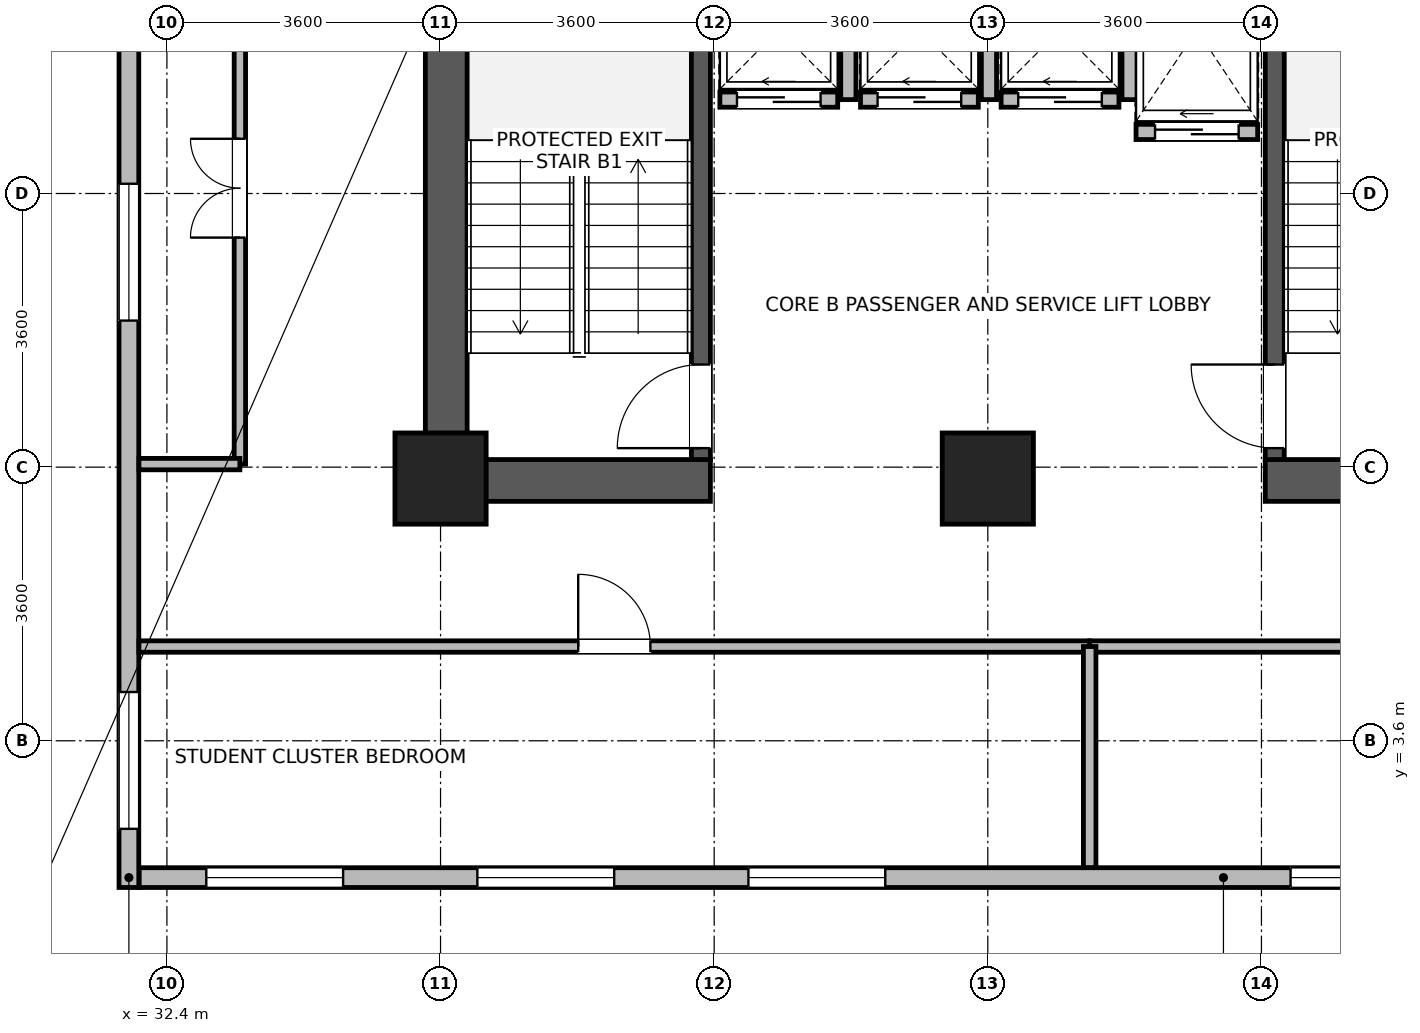
"""IFC4 building model, lengths in metres.
Left out: names, types, materials, properties, quantities, classifications, styles, units other than length and angle.
Written with IfcOpenShell. Run it as: python <this file> out.ifc"""

import sys

from ifc_helpers import new_model, si_unit, direction, frame, frame_2d, origin, origin_2d, place, context, subcontext, project, spatial, rectangle, extrude, source, transform, mapped, element, fill, save


model = new_model("IFC4")
c1 = context("Model", 3, precision=1e-05, world=origin(), true_north=direction((0.0, 1.0)))
c2 = subcontext(c1, "Body", "Model", "MODEL_VIEW")
j1 = project(units=[si_unit("LENGTHUNIT", "METRE"), si_unit("PLANEANGLEUNIT", "RADIAN")], contexts=[c1])
p1 = place(None, origin())
s1 = spatial("IfcSite", under=j1, at=p1, CompositionType="ELEMENT")
p2 = place(p1, origin())
s2 = spatial("IfcBuilding", under=s1, at=p2, CompositionType="ELEMENT")
p3 = place(p2, frame((0.0, 0.0, 86.0)))
s3 = spatial("IfcBuildingStorey", under=s2, at=p3, CompositionType="ELEMENT", Elevation=86.0)
p4 = place(p3, frame((36.075, 6.75, 0.0), z_axis=(0.0, 0.0, 1.0), x_axis=(0.0, 1.0, 0.0)))
e1 = element("IfcWall", 1, at=p4, inside=s3, PredefinedType="SHEAR", context=c2, shape_type="SweptSolid", body=[
    extrude(rectangle(XDim=8.1, YDim=0.55, at=frame_2d((4.05, 0.0))), origin(), (0.0, 0.0, 1.0), 3.45),
])
for number, where, z_axis, x_axis in (
    (2, (36.35, 7.025, 0.0), (0.0, 0.0, 1.0), (1.0, 0.0, 0.0)),
    (3, (46.85, 7.025, 0.0), (0.0, 0.0, 1.0), (1.0, 0.0, 0.0)),
):
    element("IfcWall", number, at=place(p3, frame(where, z_axis=z_axis, x_axis=x_axis)), inside=s3, PredefinedType="SHEAR", context=c2, shape_type="SweptSolid", body=[
        extrude(rectangle(XDim=3.2, YDim=0.55, at=frame_2d((1.6, 0.0))), origin(), (0.0, 0.0, 1.0), 3.45),
    ])
p5 = place(p3, frame((39.425, 7.3, 0.0), z_axis=(0.0, 0.0, 1.0), x_axis=(0.0, 1.0, 0.0)))
e4 = element("IfcWall", 4, at=p5, inside=s3, PredefinedType="SHEAR", context=c2, shape_type="SweptSolid", body=[
    extrude(rectangle(XDim=7.0, YDim=0.25, at=frame_2d((3.5, 0.0))), origin(), (0.0, 0.0, 1.0), 3.45),
])
p6 = place(p5, frame((0.15, 0.0, 0.0)))
e5 = element("IfcOpeningElement", 5, at=p6, cuts=e4, PredefinedType="OPENING", context=c2, shape_type="SweptSolid", body=[
    extrude(rectangle(XDim=1.1, YDim=2.08, at=frame_2d((0.55, 1.04))), frame((0.0, 0.135, 0.0), z_axis=(0.0, -1.0, 0.0), x_axis=(1.0, 0.0, 0.0)), (0.0, 0.0, 1.0), 0.27),
])
p7 = place(p3, frame((46.975, 7.3, 0.0), z_axis=(0.0, 0.0, 1.0), x_axis=(0.0, 1.0, 0.0)))
e6 = element("IfcWall", 6, at=p7, inside=s3, PredefinedType="SHEAR", context=c2, shape_type="SweptSolid", body=[
    extrude(rectangle(XDim=7.0, YDim=0.25, at=frame_2d((3.5, 0.0))), origin(), (0.0, 0.0, 1.0), 3.45),
])
p8 = place(p7, frame((0.15, 0.0, 0.0)))
e7 = element("IfcOpeningElement", 7, at=p8, cuts=e6, PredefinedType="OPENING", context=c2, shape_type="SweptSolid", body=[
    extrude(rectangle(XDim=1.1, YDim=2.08, at=frame_2d((0.55, 1.04))), frame((0.0, 0.135, 0.0), z_axis=(0.0, -1.0, 0.0), x_axis=(1.0, 0.0, 0.0)), (0.0, 0.0, 1.0), 0.27),
])
m1 = source(origin(), c2, "Body", "SweptSolid", [
    extrude(rectangle(XDim=1.2, YDim=1.2, at=origin_2d()), origin(), (0.0, 0.0, 1.0), 3.7),
])
for number, where, z_axis, x_axis in (
    (8, (36.0, 7.05, 0.0), (0.0, 0.0, 1.0), (1.0, 0.0, 0.0)),
    (9, (43.2, 7.05, 0.0), (0.0, 0.0, 1.0), (1.0, 0.0, 0.0)),
):
    element("IfcColumn", number, at=place(p3, frame(where, z_axis=z_axis, x_axis=x_axis)), inside=s3, PredefinedType="COLUMN", context=c2, shape_type="MappedRepresentation", body=[
        mapped(m1, transform((0.0, 0.0, 0.0), x_axis=(1.0, 0.0, 0.0), y_axis=(0.0, 1.0, 0.0), z_axis=(0.0, 0.0, 1.0), scale=1.0)),
    ])
p9 = place(p3, frame((60.565, 1.8, 0.0), z_axis=(0.0, 0.0, 1.0), x_axis=(-1.0, 0.0, 0.0)))
e10 = element("IfcWall", 10, at=p9, inside=s3, PredefinedType="STANDARD", context=c2, shape_type="SweptSolid", body=[
    extrude(rectangle(XDim=28.53, YDim=0.26, at=frame_2d((14.265, 0.0))), origin(), (0.0, 0.0, 1.0), 3.43),
])
p10 = place(p9, frame((4.449, 0.0, 0.85)))
e11 = element("IfcOpeningElement", 11, at=p10, cuts=e10, PredefinedType="OPENING", context=c2, shape_type="SweptSolid", body=[
    extrude(rectangle(XDim=1.8, YDim=1.85, at=frame_2d((0.9, 0.925))), frame((0.0, 0.14, 0.0), z_axis=(0.0, -1.0, 0.0), x_axis=(1.0, 0.0, 0.0)), (0.0, 0.0, 1.0), 0.28),
])
p11 = place(p9, frame((8.016, 0.0, 0.85)))
e12 = element("IfcOpeningElement", 12, at=p11, cuts=e10, PredefinedType="OPENING", context=c2, shape_type="SweptSolid", body=[
    extrude(rectangle(XDim=1.8, YDim=1.85, at=frame_2d((0.9, 0.925))), frame((0.0, 0.14, 0.0), z_axis=(0.0, -1.0, 0.0), x_axis=(1.0, 0.0, 0.0)), (0.0, 0.0, 1.0), 0.28),
])
p12 = place(p9, frame((11.582, 0.0, 0.85)))
e13 = element("IfcOpeningElement", 13, at=p12, cuts=e10, PredefinedType="OPENING", context=c2, shape_type="SweptSolid", body=[
    extrude(rectangle(XDim=1.8, YDim=1.85, at=frame_2d((0.9, 0.925))), frame((0.0, 0.14, 0.0), z_axis=(0.0, -1.0, 0.0), x_axis=(1.0, 0.0, 0.0)), (0.0, 0.0, 1.0), 0.28),
])
p13 = place(p9, frame((18.714, 0.0, 0.85)))
e14 = element("IfcOpeningElement", 14, at=p13, cuts=e10, PredefinedType="OPENING", context=c2, shape_type="SweptSolid", body=[
    extrude(rectangle(XDim=1.8, YDim=1.85, at=frame_2d((0.9, 0.925))), frame((0.0, 0.14, 0.0), z_axis=(0.0, -1.0, 0.0), x_axis=(1.0, 0.0, 0.0)), (0.0, 0.0, 1.0), 0.28),
])
p14 = place(p9, frame((22.281, 0.0, 0.85)))
e15 = element("IfcOpeningElement", 15, at=p14, cuts=e10, PredefinedType="OPENING", context=c2, shape_type="SweptSolid", body=[
    extrude(rectangle(XDim=1.8, YDim=1.85, at=frame_2d((0.9, 0.925))), frame((0.0, 0.14, 0.0), z_axis=(0.0, -1.0, 0.0), x_axis=(1.0, 0.0, 0.0)), (0.0, 0.0, 1.0), 0.28),
])
p15 = place(p9, frame((25.847, 0.0, 0.85)))
e16 = element("IfcOpeningElement", 16, at=p15, cuts=e10, PredefinedType="OPENING", context=c2, shape_type="SweptSolid", body=[
    extrude(rectangle(XDim=1.8, YDim=1.85, at=frame_2d((0.9, 0.925))), frame((0.0, 0.14, 0.0), z_axis=(0.0, -1.0, 0.0), x_axis=(1.0, 0.0, 0.0)), (0.0, 0.0, 1.0), 0.28),
])
p16 = place(p3, frame((31.9, 1.67, 0.0), z_axis=(0.0, 0.0, 1.0), x_axis=(0.0, 1.0, 0.0)))
e17 = element("IfcWall", 17, at=p16, inside=s3, PredefinedType="STANDARD", context=c2, shape_type="SweptSolid", body=[
    extrude(rectangle(XDim=20.06, YDim=0.26, at=frame_2d((10.03, 0.0))), origin(), (0.0, 0.0, 1.0), 3.43),
])
p17 = place(p16, frame((0.772, 0.0, 0.85)))
e18 = element("IfcOpeningElement", 18, at=p17, cuts=e17, PredefinedType="OPENING", context=c2, shape_type="SweptSolid", body=[
    extrude(rectangle(XDim=1.8, YDim=1.85, at=frame_2d((0.9, 0.925))), frame((0.0, 0.14, 0.0), z_axis=(0.0, -1.0, 0.0), x_axis=(1.0, 0.0, 0.0)), (0.0, 0.0, 1.0), 0.28),
])
p18 = place(p16, frame((7.458, 0.0, 0.85)))
e19 = element("IfcOpeningElement", 19, at=p18, cuts=e17, PredefinedType="OPENING", context=c2, shape_type="SweptSolid", body=[
    extrude(rectangle(XDim=1.8, YDim=1.85, at=frame_2d((0.9, 0.925))), frame((0.0, 0.14, 0.0), z_axis=(0.0, -1.0, 0.0), x_axis=(1.0, 0.0, 0.0)), (0.0, 0.0, 1.0), 0.28),
])
p19 = place(p16, frame((14.145, 0.0, 0.85)))
e20 = element("IfcOpeningElement", 20, at=p19, cuts=e17, PredefinedType="OPENING", context=c2, shape_type="SweptSolid", body=[
    extrude(rectangle(XDim=1.8, YDim=1.85, at=frame_2d((0.9, 0.925))), frame((0.0, 0.14, 0.0), z_axis=(0.0, -1.0, 0.0), x_axis=(1.0, 0.0, 0.0)), (0.0, 0.0, 1.0), 0.28),
])
p20 = place(p16, frame((17.488, 0.0, 0.85)))
e21 = element("IfcOpeningElement", 21, at=p20, cuts=e17, PredefinedType="OPENING", context=c2, shape_type="SweptSolid", body=[
    extrude(rectangle(XDim=1.8, YDim=1.85, at=frame_2d((0.9, 0.925))), frame((0.0, 0.14, 0.0), z_axis=(0.0, -1.0, 0.0), x_axis=(1.0, 0.0, 0.0)), (0.0, 0.0, 1.0), 0.28),
])
p21 = place(p3, frame((39.675, 12.035, 0.0), z_axis=(0.0, 0.0, 1.0), x_axis=(1.0, 0.0, 0.0)))
e22 = element("IfcWall", 22, at=p21, inside=s3, PredefinedType="PARTITIONING", context=c2, shape_type="SweptSolid", body=[
    extrude(rectangle(XDim=1.55, YDim=0.2, at=frame_2d((0.775, 0.0))), origin(), (0.0, 0.0, 1.0), 3.43),
])
p22 = place(p21, frame((0.225, 0.0, 0.0)))
e23 = element("IfcOpeningElement", 23, at=p22, cuts=e22, PredefinedType="OPENING", context=c2, shape_type="SweptSolid", body=[
    extrude(rectangle(XDim=1.1, YDim=2.12, at=frame_2d((0.55, 1.06))), frame((0.0, 0.11, 0.0), z_axis=(0.0, -1.0, 0.0), x_axis=(1.0, 0.0, 0.0)), (0.0, 0.0, 1.0), 0.22),
])
p23 = place(p3, frame((41.365, 12.035, 0.0), z_axis=(0.0, 0.0, 1.0), x_axis=(0.0, 1.0, 0.0)))
e24 = element("IfcWall", 24, at=p23, inside=s3, PredefinedType="PARTITIONING", context=c2, shape_type="SweptSolid", body=[
    extrude(rectangle(XDim=1.83, YDim=0.2, at=frame_2d((0.915, 0.0))), origin(), (0.0, 0.0, 1.0), 3.43),
])
p24 = place(p3, frame((41.525, 12.035, 0.0), z_axis=(0.0, 0.0, 1.0), x_axis=(1.0, 0.0, 0.0)))
e25 = element("IfcWall", 25, at=p24, inside=s3, PredefinedType="PARTITIONING", context=c2, shape_type="SweptSolid", body=[
    extrude(rectangle(XDim=1.55, YDim=0.2, at=frame_2d((0.775, 0.0))), origin(), (0.0, 0.0, 1.0), 3.43),
])
p25 = place(p24, frame((0.225, 0.0, 0.0)))
e26 = element("IfcOpeningElement", 26, at=p25, cuts=e25, PredefinedType="OPENING", context=c2, shape_type="SweptSolid", body=[
    extrude(rectangle(XDim=1.1, YDim=2.12, at=frame_2d((0.55, 1.06))), frame((0.0, 0.11, 0.0), z_axis=(0.0, -1.0, 0.0), x_axis=(1.0, 0.0, 0.0)), (0.0, 0.0, 1.0), 0.22),
])
p26 = place(p3, frame((43.215, 12.035, 0.0), z_axis=(0.0, 0.0, 1.0), x_axis=(0.0, 1.0, 0.0)))
e27 = element("IfcWall", 27, at=p26, inside=s3, PredefinedType="PARTITIONING", context=c2, shape_type="SweptSolid", body=[
    extrude(rectangle(XDim=1.83, YDim=0.2, at=frame_2d((0.915, 0.0))), origin(), (0.0, 0.0, 1.0), 3.43),
])
p27 = place(p3, frame((43.375, 12.035, 0.0), z_axis=(0.0, 0.0, 1.0), x_axis=(1.0, 0.0, 0.0)))
e28 = element("IfcWall", 28, at=p27, inside=s3, PredefinedType="PARTITIONING", context=c2, shape_type="SweptSolid", body=[
    extrude(rectangle(XDim=1.55, YDim=0.2, at=frame_2d((0.775, 0.0))), origin(), (0.0, 0.0, 1.0), 3.43),
])
p28 = place(p27, frame((0.225, 0.0, 0.0)))
e29 = element("IfcOpeningElement", 29, at=p28, cuts=e28, PredefinedType="OPENING", context=c2, shape_type="SweptSolid", body=[
    extrude(rectangle(XDim=1.1, YDim=2.12, at=frame_2d((0.55, 1.06))), frame((0.0, 0.11, 0.0), z_axis=(0.0, -1.0, 0.0), x_axis=(1.0, 0.0, 0.0)), (0.0, 0.0, 1.0), 0.22),
])
p29 = place(p3, frame((45.065, 12.035, 0.0), z_axis=(0.0, 0.0, 1.0), x_axis=(0.0, 1.0, 0.0)))
e30 = element("IfcWall", 30, at=p29, inside=s3, PredefinedType="PARTITIONING", context=c2, shape_type="SweptSolid", body=[
    extrude(rectangle(XDim=1.83, YDim=0.2, at=frame_2d((0.915, 0.0))), origin(), (0.0, 0.0, 1.0), 3.43),
])
p30 = place(p3, frame((45.15, 11.61, 0.0), z_axis=(0.0, 0.0, 1.0), x_axis=(1.0, 0.0, 0.0)))
e31 = element("IfcWall", 31, at=p30, inside=s3, PredefinedType="PARTITIONING", context=c2, shape_type="SweptSolid", body=[
    extrude(rectangle(XDim=1.6, YDim=0.2, at=frame_2d((0.8, 0.0))), origin(), (0.0, 0.0, 1.0), 3.43),
])
p31 = place(p30, frame((0.25, 0.0, 0.0)))
e32 = element("IfcOpeningElement", 32, at=p31, cuts=e31, PredefinedType="OPENING", context=c2, shape_type="SweptSolid", body=[
    extrude(rectangle(XDim=1.1, YDim=2.12, at=frame_2d((0.55, 1.06))), frame((0.0, 0.11, 0.0), z_axis=(0.0, -1.0, 0.0), x_axis=(1.0, 0.0, 0.0)), (0.0, 0.0, 1.0), 0.22),
])
p32 = place(p3, frame((44.54, 4.84, 0.0), z_axis=(0.0, 0.0, 1.0), x_axis=(1.0, 0.0, 0.0)))
e33 = element("IfcWall", 33, at=p32, inside=s3, PredefinedType="PARTITIONING", context=c2, shape_type="SweptSolid", body=[
    extrude(rectangle(XDim=13.62, YDim=0.15, at=frame_2d((6.81, 0.0))), origin(), (0.0, 0.0, 1.0), 3.43),
])
p33 = place(p32, frame((6.335, 0.0, 0.0)))
e34 = element("IfcOpeningElement", 34, at=p33, cuts=e33, PredefinedType="OPENING", context=c2, shape_type="SweptSolid", body=[
    extrude(rectangle(XDim=0.95, YDim=2.1, at=frame_2d((0.475, 1.05))), frame((0.0, 0.085, 0.0), z_axis=(0.0, -1.0, 0.0), x_axis=(1.0, 0.0, 0.0)), (0.0, 0.0, 1.0), 0.17),
])
p34 = place(p3, frame((32.032, 4.84, 0.0), z_axis=(0.0, 0.0, 1.0), x_axis=(1.0, 0.0, 0.0)))
e35 = element("IfcWall", 35, at=p34, inside=s3, PredefinedType="PARTITIONING", context=c2, shape_type="SweptSolid", body=[
    extrude(rectangle(XDim=12.508, YDim=0.15, at=frame_2d((6.254, 0.0))), origin(), (0.0, 0.0, 1.0), 3.43),
])
p35 = place(p34, frame((5.779, 0.0, 0.0)))
e36 = element("IfcOpeningElement", 36, at=p35, cuts=e35, PredefinedType="OPENING", context=c2, shape_type="SweptSolid", body=[
    extrude(rectangle(XDim=0.95, YDim=2.1, at=frame_2d((0.475, 1.05))), frame((0.0, 0.085, 0.0), z_axis=(0.0, -1.0, 0.0), x_axis=(1.0, 0.0, 0.0)), (0.0, 0.0, 1.0), 0.17),
])
p36 = place(p3, frame((33.36, 7.24, 0.0), z_axis=(0.0, 0.0, 1.0), x_axis=(0.0, 1.0, 0.0)))
e37 = element("IfcWall", 37, at=p36, inside=s3, PredefinedType="PARTITIONING", context=c2, shape_type="SweptSolid", body=[
    extrude(rectangle(XDim=7.26, YDim=0.15, at=frame_2d((3.63, 0.0))), origin(), (0.0, 0.0, 1.0), 3.43),
])
p37 = place(p36, frame((2.98, 0.0, 0.0)))
e38 = element("IfcOpeningElement", 38, at=p37, cuts=e37, PredefinedType="OPENING", context=c2, shape_type="SweptSolid", body=[
    extrude(rectangle(XDim=1.3, YDim=2.12, at=frame_2d((0.65, 1.06))), frame((0.0, 0.085, 0.0), z_axis=(0.0, -1.0, 0.0), x_axis=(1.0, 0.0, 0.0)), (0.0, 0.0, 1.0), 0.17),
])
p38 = place(p3, frame((32.032, 7.24, 0.0), z_axis=(0.0, 0.0, 1.0), x_axis=(1.0, 0.0, 0.0)))
e39 = element("IfcWall", 39, at=p38, inside=s3, PredefinedType="PARTITIONING", context=c2, shape_type="SweptSolid", body=[
    extrude(rectangle(XDim=1.328, YDim=0.15, at=frame_2d((0.664, 0.0))), origin(), (0.0, 0.0, 1.0), 3.43),
])
p39 = place(p3, frame((44.54, 1.932, 0.0), z_axis=(0.0, 0.0, 1.0), x_axis=(0.0, 1.0, 0.0)))
e40 = element("IfcWall", 40, at=p39, inside=s3, PredefinedType="PARTITIONING", context=c2, shape_type="SweptSolid", body=[
    extrude(rectangle(XDim=2.908, YDim=0.165, at=frame_2d((1.454, 0.0))), origin(), (0.0, 0.0, 1.0), 3.43),
])
p40 = place(p12, origin())
e41 = element("IfcWindow", 41, at=p40, inside=s3, PartitioningType="SINGLE_PANEL", PredefinedType="WINDOW", context=c2, shape_type="SweptSolid", body=[
    extrude(rectangle(XDim=1.8, YDim=1.85, at=frame_2d((0.9, 0.925))), frame((0.0, 0.03, 0.0), z_axis=(0.0, -1.0, 0.0), x_axis=(1.0, 0.0, 0.0)), (0.0, 0.0, 1.0), 0.06),
])
fill(e13, e41)
p41 = place(p13, origin())
e42 = element("IfcWindow", 42, at=p41, inside=s3, PartitioningType="SINGLE_PANEL", PredefinedType="WINDOW", context=c2, shape_type="SweptSolid", body=[
    extrude(rectangle(XDim=1.8, YDim=1.85, at=frame_2d((0.9, 0.925))), frame((0.0, 0.03, 0.0), z_axis=(0.0, -1.0, 0.0), x_axis=(1.0, 0.0, 0.0)), (0.0, 0.0, 1.0), 0.06),
])
fill(e14, e42)
p42 = place(p14, origin())
e43 = element("IfcWindow", 43, at=p42, inside=s3, PartitioningType="SINGLE_PANEL", PredefinedType="WINDOW", context=c2, shape_type="SweptSolid", body=[
    extrude(rectangle(XDim=1.8, YDim=1.85, at=frame_2d((0.9, 0.925))), frame((0.0, 0.03, 0.0), z_axis=(0.0, -1.0, 0.0), x_axis=(1.0, 0.0, 0.0)), (0.0, 0.0, 1.0), 0.06),
])
fill(e15, e43)
p43 = place(p15, origin())
e44 = element("IfcWindow", 44, at=p43, inside=s3, PartitioningType="SINGLE_PANEL", PredefinedType="WINDOW", context=c2, shape_type="SweptSolid", body=[
    extrude(rectangle(XDim=1.8, YDim=1.85, at=frame_2d((0.9, 0.925))), frame((0.0, 0.03, 0.0), z_axis=(0.0, -1.0, 0.0), x_axis=(1.0, 0.0, 0.0)), (0.0, 0.0, 1.0), 0.06),
])
fill(e16, e44)
p44 = place(p17, origin())
e45 = element("IfcWindow", 45, at=p44, inside=s3, PartitioningType="SINGLE_PANEL", PredefinedType="WINDOW", context=c2, shape_type="SweptSolid", body=[
    extrude(rectangle(XDim=1.8, YDim=1.85, at=frame_2d((0.9, 0.925))), frame((0.0, 0.03, 0.0), z_axis=(0.0, -1.0, 0.0), x_axis=(1.0, 0.0, 0.0)), (0.0, 0.0, 1.0), 0.06),
])
fill(e18, e45)
p45 = place(p18, origin())
e46 = element("IfcWindow", 46, at=p45, inside=s3, PartitioningType="SINGLE_PANEL", PredefinedType="WINDOW", context=c2, shape_type="SweptSolid", body=[
    extrude(rectangle(XDim=1.8, YDim=1.85, at=frame_2d((0.9, 0.925))), frame((0.0, 0.03, 0.0), z_axis=(0.0, -1.0, 0.0), x_axis=(1.0, 0.0, 0.0)), (0.0, 0.0, 1.0), 0.06),
])
fill(e19, e46)
p46 = place(p6, origin())
e47 = element("IfcDoor", 47, at=p46, inside=s3, OperationType="SINGLE_SWING_LEFT", PredefinedType="DOOR", context=c2, shape_type="SweptSolid", body=[
    extrude(rectangle(XDim=1.1, YDim=2.08, at=frame_2d((0.55, 1.04))), frame((0.0, 0.025, 0.0), z_axis=(0.0, -1.0, 0.0), x_axis=(1.0, 0.0, 0.0)), (0.0, 0.0, 1.0), 0.05),
])
fill(e5, e47)
p47 = place(p8, origin())
e48 = element("IfcDoor", 48, at=p47, inside=s3, OperationType="SINGLE_SWING_RIGHT", PredefinedType="DOOR", context=c2, shape_type="SweptSolid", body=[
    extrude(rectangle(XDim=1.1, YDim=2.08, at=frame_2d((0.55, 1.04))), frame((0.0, 0.025, 0.0), z_axis=(0.0, -1.0, 0.0), x_axis=(1.0, 0.0, 0.0)), (0.0, 0.0, 1.0), 0.05),
])
fill(e7, e48)
p48 = place(p22, origin())
e49 = element("IfcDoor", 49, at=p48, inside=s3, OperationType="SLIDING_TO_LEFT", PredefinedType="DOOR", context=c2, shape_type="SweptSolid", body=[
    extrude(rectangle(XDim=1.1, YDim=2.12, at=frame_2d((0.55, 1.06))), frame((0.0, 0.025, 0.0), z_axis=(0.0, -1.0, 0.0), x_axis=(1.0, 0.0, 0.0)), (0.0, 0.0, 1.0), 0.05),
])
fill(e23, e49)
p49 = place(p25, origin())
e50 = element("IfcDoor", 50, at=p49, inside=s3, OperationType="SLIDING_TO_LEFT", PredefinedType="DOOR", context=c2, shape_type="SweptSolid", body=[
    extrude(rectangle(XDim=1.1, YDim=2.12, at=frame_2d((0.55, 1.06))), frame((0.0, 0.025, 0.0), z_axis=(0.0, -1.0, 0.0), x_axis=(1.0, 0.0, 0.0)), (0.0, 0.0, 1.0), 0.05),
])
fill(e26, e50)
p50 = place(p28, origin())
e51 = element("IfcDoor", 51, at=p50, inside=s3, OperationType="SLIDING_TO_LEFT", PredefinedType="DOOR", context=c2, shape_type="SweptSolid", body=[
    extrude(rectangle(XDim=1.1, YDim=2.12, at=frame_2d((0.55, 1.06))), frame((0.0, 0.025, 0.0), z_axis=(0.0, -1.0, 0.0), x_axis=(1.0, 0.0, 0.0)), (0.0, 0.0, 1.0), 0.05),
])
fill(e29, e51)
p51 = place(p31, origin())
e52 = element("IfcDoor", 52, at=p51, inside=s3, OperationType="SLIDING_TO_LEFT", PredefinedType="DOOR", context=c2, shape_type="SweptSolid", body=[
    extrude(rectangle(XDim=1.1, YDim=2.12, at=frame_2d((0.55, 1.06))), frame((0.0, 0.025, 0.0), z_axis=(0.0, -1.0, 0.0), x_axis=(1.0, 0.0, 0.0)), (0.0, 0.0, 1.0), 0.05),
])
fill(e32, e52)
p52 = place(p35, origin())
e53 = element("IfcDoor", 53, at=p52, inside=s3, OperationType="SINGLE_SWING_LEFT", PredefinedType="DOOR", context=c2, shape_type="SweptSolid", body=[
    extrude(rectangle(XDim=0.95, YDim=2.1, at=frame_2d((0.475, 1.05))), frame((0.0, 0.025, 0.0), z_axis=(0.0, -1.0, 0.0), x_axis=(1.0, 0.0, 0.0)), (0.0, 0.0, 1.0), 0.05),
])
fill(e36, e53)
p53 = place(p37, origin())
e54 = element("IfcDoor", 54, at=p53, inside=s3, OperationType="DOUBLE_DOOR_SINGLE_SWING", PredefinedType="DOOR", context=c2, shape_type="SweptSolid", body=[
    extrude(rectangle(XDim=1.3, YDim=2.12, at=frame_2d((0.65, 1.06))), frame((0.0, 0.025, 0.0), z_axis=(0.0, -1.0, 0.0), x_axis=(1.0, 0.0, 0.0)), (0.0, 0.0, 1.0), 0.05),
])
fill(e38, e54)
save(model, sys.argv[1])
